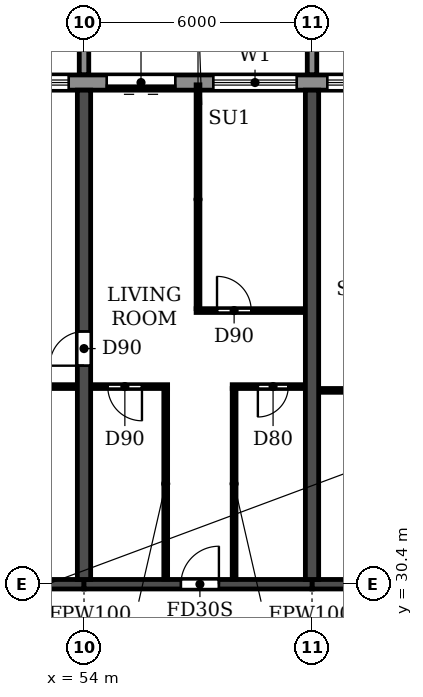
"""IFC4 building model, lengths in metres.
Left out: names, types, materials, properties, quantities, classifications, styles, units other than length and angle.
Written with IfcOpenShell. Run it as: python <this file> out.ifc"""

import sys

from ifc_helpers import new_model, si_unit, direction, frame, frame_2d, origin, place, context, subcontext, project, spatial, polyline, rectangle, outline, extrude, source, transform, mapped, element, fill, save


model = new_model("IFC4")
c1 = context("Model", 3, precision=1e-05, world=origin(), true_north=direction((0.0, 1.0)))
c2 = subcontext(c1, "Body", "Model", "MODEL_VIEW")
j1 = project(units=[si_unit("LENGTHUNIT", "METRE"), si_unit("PLANEANGLEUNIT", "RADIAN")], contexts=[c1])
p1 = place(None, origin())
s1 = spatial("IfcSite", under=j1, at=p1, CompositionType="ELEMENT")
p2 = place(p1, origin())
s2 = spatial("IfcBuilding", under=s1, at=p2, CompositionType="ELEMENT")
p3 = place(p2, frame((0.0, 0.0, 102.6)))
s3 = spatial("IfcBuildingStorey", under=s2, at=p3, CompositionType="ELEMENT", Elevation=102.6)
p4 = place(p3, frame((54.0, 30.525, 0.0), z_axis=(0.0, 0.0, 1.0), x_axis=(0.0, 1.0, 0.0)))
e1 = element("IfcWall", 1, at=p4, inside=s3, PredefinedType="SHEAR", context=c2, shape_type="SweptSolid", body=[
    extrude(rectangle(XDim=12.875, YDim=0.35, at=frame_2d((6.438, 0.0))), origin(), (0.0, 0.0, 1.0), 3.0),
])
p5 = place(p4, frame((5.625, 0.0, 0.0)))
e2 = element("IfcOpeningElement", 2, at=p5, cuts=e1, PredefinedType="OPENING", context=c2, shape_type="SweptSolid", body=[
    extrude(rectangle(XDim=0.9, YDim=2.1, at=frame_2d((0.45, 1.05))), frame((0.0, 0.185, 0.0), z_axis=(0.0, -1.0, 0.0), x_axis=(1.0, 0.0, 0.0)), (0.0, 0.0, 1.0), 0.37),
])
p6 = place(p3, frame((60.0, 30.525, 0.0), z_axis=(0.0, 0.0, 1.0), x_axis=(0.0, 1.0, 0.0)))
e3 = element("IfcWall", 3, at=p6, inside=s3, PredefinedType="SHEAR", context=c2, shape_type="SweptSolid", body=[
    extrude(rectangle(XDim=12.875, YDim=0.35, at=frame_2d((6.438, 0.0))), origin(), (0.0, 0.0, 1.0), 3.0),
])
p7 = place(p3, frame((48.0, 30.4, 0.0), z_axis=(0.0, 0.0, 1.0), x_axis=(1.0, 0.0, 0.0)))
e4 = element("IfcWall", 4, at=p7, inside=s3, PredefinedType="SHEAR", context=c2, shape_type="SweptSolid", body=[
    extrude(rectangle(XDim=6.0, YDim=0.25, at=frame_2d((3.0, 0.0))), origin(), (0.0, 0.0, 1.0), 2.4),
])
p8 = place(p3, frame((54.0, 30.4, 0.0), z_axis=(0.0, 0.0, 1.0), x_axis=(1.0, 0.0, 0.0)))
e5 = element("IfcWall", 5, at=p8, inside=s3, PredefinedType="SHEAR", context=c2, shape_type="SweptSolid", body=[
    extrude(rectangle(XDim=6.0, YDim=0.25, at=frame_2d((3.0, 0.0))), origin(), (0.0, 0.0, 1.0), 2.4),
])
p9 = place(p8, frame((2.55, 0.0, 0.0)))
e6 = element("IfcOpeningElement", 6, at=p9, cuts=e5, PredefinedType="OPENING", context=c2, shape_type="SweptSolid", body=[
    extrude(rectangle(XDim=1.0, YDim=2.1, at=frame_2d((0.5, 1.05))), frame((0.0, 0.135, 0.0), z_axis=(0.0, -1.0, 0.0), x_axis=(1.0, 0.0, 0.0)), (0.0, 0.0, 1.0), 0.27),
])
p10 = place(p3, frame((60.0, 30.4, 0.0), z_axis=(0.0, 0.0, 1.0), x_axis=(1.0, 0.0, 0.0)))
e7 = element("IfcWall", 7, at=p10, inside=s3, PredefinedType="SHEAR", context=c2, shape_type="SweptSolid", body=[
    extrude(rectangle(XDim=6.0, YDim=0.25, at=frame_2d((3.0, 0.0))), origin(), (0.0, 0.0, 1.0), 2.4),
])
p11 = place(p10, frame((2.45, 0.0, 0.0)))
e8 = element("IfcOpeningElement", 8, at=p11, cuts=e7, PredefinedType="OPENING", context=c2, shape_type="SweptSolid", body=[
    extrude(rectangle(XDim=1.0, YDim=2.1, at=frame_2d((0.5, 1.05))), frame((0.0, 0.135, 0.0), z_axis=(0.0, -1.0, 0.0), x_axis=(1.0, 0.0, 0.0)), (0.0, 0.0, 1.0), 0.27),
])
p12 = place(p3, frame((91.317, 43.6, 0.0), z_axis=(0.0, 0.0, 1.0), x_axis=(-1.0, 0.0, 0.0)))
e9 = element("IfcWall", 9, at=p12, inside=s3, PredefinedType="STANDARD", context=c2, shape_type="SweptSolid", body=[
    extrude(rectangle(XDim=80.634, YDim=0.4, at=frame_2d((40.317, 0.0))), origin(), (0.0, 0.0, 1.0), 3.0),
])
p13 = place(p12, frame((76.717, 0.0, 0.9)))
e10 = element("IfcOpeningElement", 10, at=p13, cuts=e9, PredefinedType="OPENING", context=c2, shape_type="SweptSolid", body=[
    extrude(rectangle(XDim=2.2, YDim=1.5, at=frame_2d((1.1, 0.75))), frame((0.0, 0.21, 0.0), z_axis=(0.0, -1.0, 0.0), x_axis=(1.0, 0.0, 0.0)), (0.0, 0.0, 1.0), 0.42),
])
p14 = place(p12, frame((73.917, 0.0, 0.0)))
e11 = element("IfcOpeningElement", 11, at=p14, cuts=e9, PredefinedType="OPENING", context=c2, shape_type="SweptSolid", body=[
    extrude(rectangle(XDim=1.8, YDim=2.4, at=frame_2d((0.9, 1.2))), frame((0.0, 0.21, 0.0), z_axis=(0.0, -1.0, 0.0), x_axis=(1.0, 0.0, 0.0)), (0.0, 0.0, 1.0), 0.42),
])
p15 = place(p12, frame((70.717, 0.0, 0.9)))
e12 = element("IfcOpeningElement", 12, at=p15, cuts=e9, PredefinedType="OPENING", context=c2, shape_type="SweptSolid", body=[
    extrude(rectangle(XDim=2.2, YDim=1.5, at=frame_2d((1.1, 0.75))), frame((0.0, 0.21, 0.0), z_axis=(0.0, -1.0, 0.0), x_axis=(1.0, 0.0, 0.0)), (0.0, 0.0, 1.0), 0.42),
])
p16 = place(p12, frame((67.717, 0.0, 0.9)))
e13 = element("IfcOpeningElement", 13, at=p16, cuts=e9, PredefinedType="OPENING", context=c2, shape_type="SweptSolid", body=[
    extrude(rectangle(XDim=2.2, YDim=1.5, at=frame_2d((1.1, 0.75))), frame((0.0, 0.21, 0.0), z_axis=(0.0, -1.0, 0.0), x_axis=(1.0, 0.0, 0.0)), (0.0, 0.0, 1.0), 0.42),
])
p17 = place(p12, frame((64.917, 0.0, 0.0)))
e14 = element("IfcOpeningElement", 14, at=p17, cuts=e9, PredefinedType="OPENING", context=c2, shape_type="SweptSolid", body=[
    extrude(rectangle(XDim=1.8, YDim=2.4, at=frame_2d((0.9, 1.2))), frame((0.0, 0.21, 0.0), z_axis=(0.0, -1.0, 0.0), x_axis=(1.0, 0.0, 0.0)), (0.0, 0.0, 1.0), 0.42),
])
p18 = place(p12, frame((61.717, 0.0, 0.9)))
e15 = element("IfcOpeningElement", 15, at=p18, cuts=e9, PredefinedType="OPENING", context=c2, shape_type="SweptSolid", body=[
    extrude(rectangle(XDim=2.2, YDim=1.5, at=frame_2d((1.1, 0.75))), frame((0.0, 0.21, 0.0), z_axis=(0.0, -1.0, 0.0), x_axis=(1.0, 0.0, 0.0)), (0.0, 0.0, 1.0), 0.42),
])
p19 = place(p12, frame((58.717, 0.0, 0.9)))
e16 = element("IfcOpeningElement", 16, at=p19, cuts=e9, PredefinedType="OPENING", context=c2, shape_type="SweptSolid", body=[
    extrude(rectangle(XDim=2.2, YDim=1.5, at=frame_2d((1.1, 0.75))), frame((0.0, 0.21, 0.0), z_axis=(0.0, -1.0, 0.0), x_axis=(1.0, 0.0, 0.0)), (0.0, 0.0, 1.0), 0.42),
])
p20 = place(p12, frame((55.717, 0.0, 0.9)))
e17 = element("IfcOpeningElement", 17, at=p20, cuts=e9, PredefinedType="OPENING", context=c2, shape_type="SweptSolid", body=[
    extrude(rectangle(XDim=2.2, YDim=1.5, at=frame_2d((1.1, 0.75))), frame((0.0, 0.21, 0.0), z_axis=(0.0, -1.0, 0.0), x_axis=(1.0, 0.0, 0.0)), (0.0, 0.0, 1.0), 0.42),
])
p21 = place(p12, frame((52.717, 0.0, 0.9)))
e18 = element("IfcOpeningElement", 18, at=p21, cuts=e9, PredefinedType="OPENING", context=c2, shape_type="SweptSolid", body=[
    extrude(rectangle(XDim=2.2, YDim=1.5, at=frame_2d((1.1, 0.75))), frame((0.0, 0.21, 0.0), z_axis=(0.0, -1.0, 0.0), x_axis=(1.0, 0.0, 0.0)), (0.0, 0.0, 1.0), 0.42),
])
p22 = place(p12, frame((49.917, 0.0, 0.0)))
e19 = element("IfcOpeningElement", 19, at=p22, cuts=e9, PredefinedType="OPENING", context=c2, shape_type="SweptSolid", body=[
    extrude(rectangle(XDim=1.8, YDim=2.4, at=frame_2d((0.9, 1.2))), frame((0.0, 0.21, 0.0), z_axis=(0.0, -1.0, 0.0), x_axis=(1.0, 0.0, 0.0)), (0.0, 0.0, 1.0), 0.42),
])
p23 = place(p12, frame((46.717, 0.0, 0.9)))
e20 = element("IfcOpeningElement", 20, at=p23, cuts=e9, PredefinedType="OPENING", context=c2, shape_type="SweptSolid", body=[
    extrude(rectangle(XDim=2.2, YDim=1.5, at=frame_2d((1.1, 0.75))), frame((0.0, 0.21, 0.0), z_axis=(0.0, -1.0, 0.0), x_axis=(1.0, 0.0, 0.0)), (0.0, 0.0, 1.0), 0.42),
])
p24 = place(p12, frame((43.917, 0.0, 0.0)))
e21 = element("IfcOpeningElement", 21, at=p24, cuts=e9, PredefinedType="OPENING", context=c2, shape_type="SweptSolid", body=[
    extrude(rectangle(XDim=1.8, YDim=2.4, at=frame_2d((0.9, 1.2))), frame((0.0, 0.21, 0.0), z_axis=(0.0, -1.0, 0.0), x_axis=(1.0, 0.0, 0.0)), (0.0, 0.0, 1.0), 0.42),
])
p25 = place(p12, frame((40.717, 0.0, 0.9)))
e22 = element("IfcOpeningElement", 22, at=p25, cuts=e9, PredefinedType="OPENING", context=c2, shape_type="SweptSolid", body=[
    extrude(rectangle(XDim=2.2, YDim=1.5, at=frame_2d((1.1, 0.75))), frame((0.0, 0.21, 0.0), z_axis=(0.0, -1.0, 0.0), x_axis=(1.0, 0.0, 0.0)), (0.0, 0.0, 1.0), 0.42),
])
p26 = place(p12, frame((37.717, 0.0, 0.9)))
e23 = element("IfcOpeningElement", 23, at=p26, cuts=e9, PredefinedType="OPENING", context=c2, shape_type="SweptSolid", body=[
    extrude(rectangle(XDim=2.2, YDim=1.5, at=frame_2d((1.1, 0.75))), frame((0.0, 0.21, 0.0), z_axis=(0.0, -1.0, 0.0), x_axis=(1.0, 0.0, 0.0)), (0.0, 0.0, 1.0), 0.42),
])
p27 = place(p12, frame((34.917, 0.0, 0.0)))
e24 = element("IfcOpeningElement", 24, at=p27, cuts=e9, PredefinedType="OPENING", context=c2, shape_type="SweptSolid", body=[
    extrude(rectangle(XDim=1.8, YDim=2.4, at=frame_2d((0.9, 1.2))), frame((0.0, 0.21, 0.0), z_axis=(0.0, -1.0, 0.0), x_axis=(1.0, 0.0, 0.0)), (0.0, 0.0, 1.0), 0.42),
])
p28 = place(p12, frame((31.717, 0.0, 0.9)))
e25 = element("IfcOpeningElement", 25, at=p28, cuts=e9, PredefinedType="OPENING", context=c2, shape_type="SweptSolid", body=[
    extrude(rectangle(XDim=2.2, YDim=1.5, at=frame_2d((1.1, 0.75))), frame((0.0, 0.21, 0.0), z_axis=(0.0, -1.0, 0.0), x_axis=(1.0, 0.0, 0.0)), (0.0, 0.0, 1.0), 0.42),
])
p29 = place(p12, frame((28.717, 0.0, 0.9)))
e26 = element("IfcOpeningElement", 26, at=p29, cuts=e9, PredefinedType="OPENING", context=c2, shape_type="SweptSolid", body=[
    extrude(rectangle(XDim=2.2, YDim=1.5, at=frame_2d((1.1, 0.75))), frame((0.0, 0.21, 0.0), z_axis=(0.0, -1.0, 0.0), x_axis=(1.0, 0.0, 0.0)), (0.0, 0.0, 1.0), 0.42),
])
p30 = place(p12, frame((25.917, 0.0, 0.0)))
e27 = element("IfcOpeningElement", 27, at=p30, cuts=e9, PredefinedType="OPENING", context=c2, shape_type="SweptSolid", body=[
    extrude(rectangle(XDim=1.8, YDim=2.4, at=frame_2d((0.9, 1.2))), frame((0.0, 0.21, 0.0), z_axis=(0.0, -1.0, 0.0), x_axis=(1.0, 0.0, 0.0)), (0.0, 0.0, 1.0), 0.42),
])
p31 = place(p12, frame((22.717, 0.0, 0.9)))
e28 = element("IfcOpeningElement", 28, at=p31, cuts=e9, PredefinedType="OPENING", context=c2, shape_type="SweptSolid", body=[
    extrude(rectangle(XDim=2.2, YDim=1.5, at=frame_2d((1.1, 0.75))), frame((0.0, 0.21, 0.0), z_axis=(0.0, -1.0, 0.0), x_axis=(1.0, 0.0, 0.0)), (0.0, 0.0, 1.0), 0.42),
])
p32 = place(p12, frame((19.717, 0.0, 0.9)))
e29 = element("IfcOpeningElement", 29, at=p32, cuts=e9, PredefinedType="OPENING", context=c2, shape_type="SweptSolid", body=[
    extrude(rectangle(XDim=2.2, YDim=1.5, at=frame_2d((1.1, 0.75))), frame((0.0, 0.21, 0.0), z_axis=(0.0, -1.0, 0.0), x_axis=(1.0, 0.0, 0.0)), (0.0, 0.0, 1.0), 0.42),
])
p33 = place(p12, frame((16.917, 0.0, 0.0)))
e30 = element("IfcOpeningElement", 30, at=p33, cuts=e9, PredefinedType="OPENING", context=c2, shape_type="SweptSolid", body=[
    extrude(rectangle(XDim=1.8, YDim=2.4, at=frame_2d((0.9, 1.2))), frame((0.0, 0.21, 0.0), z_axis=(0.0, -1.0, 0.0), x_axis=(1.0, 0.0, 0.0)), (0.0, 0.0, 1.0), 0.42),
])
p34 = place(p12, frame((13.717, 0.0, 0.9)))
e31 = element("IfcOpeningElement", 31, at=p34, cuts=e9, PredefinedType="OPENING", context=c2, shape_type="SweptSolid", body=[
    extrude(rectangle(XDim=2.2, YDim=1.5, at=frame_2d((1.1, 0.75))), frame((0.0, 0.21, 0.0), z_axis=(0.0, -1.0, 0.0), x_axis=(1.0, 0.0, 0.0)), (0.0, 0.0, 1.0), 0.42),
])
p35 = place(p12, frame((10.917, 0.0, 0.0)))
e32 = element("IfcOpeningElement", 32, at=p35, cuts=e9, PredefinedType="OPENING", context=c2, shape_type="SweptSolid", body=[
    extrude(rectangle(XDim=1.8, YDim=2.4, at=frame_2d((0.9, 1.2))), frame((0.0, 0.21, 0.0), z_axis=(0.0, -1.0, 0.0), x_axis=(1.0, 0.0, 0.0)), (0.0, 0.0, 1.0), 0.42),
])
p36 = place(p12, frame((7.717, 0.0, 0.9)))
e33 = element("IfcOpeningElement", 33, at=p36, cuts=e9, PredefinedType="OPENING", context=c2, shape_type="SweptSolid", body=[
    extrude(rectangle(XDim=2.2, YDim=1.5, at=frame_2d((1.1, 0.75))), frame((0.0, 0.21, 0.0), z_axis=(0.0, -1.0, 0.0), x_axis=(1.0, 0.0, 0.0)), (0.0, 0.0, 1.0), 0.42),
])
p37 = place(p12, frame((4.717, 0.0, 0.9)))
e34 = element("IfcOpeningElement", 34, at=p37, cuts=e9, PredefinedType="OPENING", context=c2, shape_type="SweptSolid", body=[
    extrude(rectangle(XDim=2.2, YDim=1.5, at=frame_2d((1.1, 0.75))), frame((0.0, 0.21, 0.0), z_axis=(0.0, -1.0, 0.0), x_axis=(1.0, 0.0, 0.0)), (0.0, 0.0, 1.0), 0.42),
])
p38 = place(p12, frame((1.917, 0.0, 0.0)))
e35 = element("IfcOpeningElement", 35, at=p38, cuts=e9, PredefinedType="OPENING", context=c2, shape_type="SweptSolid", body=[
    extrude(rectangle(XDim=1.8, YDim=2.4, at=frame_2d((0.9, 1.2))), frame((0.0, 0.21, 0.0), z_axis=(0.0, -1.0, 0.0), x_axis=(1.0, 0.0, 0.0)), (0.0, 0.0, 1.0), 0.42),
])
m1 = source(origin(), c2, "Body", "SweptSolid", [
    extrude(outline(polyline([(0.0, 0.0), (0.25, 0.0), (0.25, 3.1), (0.0, 3.1), (0.0, 0.0)])), origin(), (0.0, 0.0, 1.0), 3.1),
])
for number, where in (
    (36, (53.875, 43.8, 0.0)),
    (37, (59.875, 43.8, 0.0)),
):
    element("IfcWall", number, at=place(p3, frame(where)), inside=s3, PredefinedType="STANDARD", context=c2, shape_type="MappedRepresentation", body=[
        mapped(m1, transform((0.0, 0.0, 0.0))),
    ])
p39 = place(p3, frame((60.185, 35.5, 0.0), z_axis=(0.0, 0.0, 1.0), x_axis=(1.0, 0.0, 0.0)))
e38 = element("IfcWall", 38, at=p39, inside=s3, PredefinedType="PARTITIONING", context=c2, shape_type="SweptSolid", body=[
    extrude(rectangle(XDim=1.915, YDim=0.1, at=frame_2d((0.958, 0.0))), origin(), (0.0, 0.0, 1.0), 3.0),
])
p40 = place(p3, frame((51.1, 35.6, 0.0), z_axis=(0.0, 0.0, 1.0), x_axis=(1.0, 0.0, 0.0)))
e39 = element("IfcWall", 39, at=p40, inside=s3, PredefinedType="PARTITIONING", context=c2, shape_type="SweptSolid", body=[
    extrude(rectangle(XDim=2.715, YDim=0.1, at=frame_2d((1.357, 0.0))), origin(), (0.0, 0.0, 1.0), 3.0),
])
p41 = place(p40, frame((1.0, 0.0, 0.0)))
e40 = element("IfcOpeningElement", 40, at=p41, cuts=e39, PredefinedType="OPENING", context=c2, shape_type="SweptSolid", body=[
    extrude(rectangle(XDim=0.8, YDim=2.1, at=frame_2d((0.4, 1.05))), frame((0.0, 0.06, 0.0), z_axis=(0.0, -1.0, 0.0), x_axis=(1.0, 0.0, 0.0)), (0.0, 0.0, 1.0), 0.12),
])
p42 = place(p3, frame((54.185, 35.6, 0.0), z_axis=(0.0, 0.0, 1.0), x_axis=(1.0, 0.0, 0.0)))
e41 = element("IfcWall", 41, at=p42, inside=s3, PredefinedType="PARTITIONING", context=c2, shape_type="SweptSolid", body=[
    extrude(rectangle(XDim=2.015, YDim=0.1, at=frame_2d((1.007, 0.0))), origin(), (0.0, 0.0, 1.0), 3.0),
])
p43 = place(p42, frame((0.44, 0.0, 0.0)))
e42 = element("IfcOpeningElement", 42, at=p43, cuts=e41, PredefinedType="OPENING", context=c2, shape_type="SweptSolid", body=[
    extrude(rectangle(XDim=0.9, YDim=2.1, at=frame_2d((0.45, 1.05))), frame((0.0, 0.06, 0.0), z_axis=(0.0, -1.0, 0.0), x_axis=(1.0, 0.0, 0.0)), (0.0, 0.0, 1.0), 0.12),
])
p44 = place(p3, frame((57.9, 35.6, 0.0), z_axis=(0.0, 0.0, 1.0), x_axis=(1.0, 0.0, 0.0)))
e43 = element("IfcWall", 43, at=p44, inside=s3, PredefinedType="PARTITIONING", context=c2, shape_type="SweptSolid", body=[
    extrude(rectangle(XDim=1.915, YDim=0.1, at=frame_2d((0.958, 0.0))), origin(), (0.0, 0.0, 1.0), 3.0),
])
p45 = place(p44, frame((0.675, 0.0, 0.0)))
e44 = element("IfcOpeningElement", 44, at=p45, cuts=e43, PredefinedType="OPENING", context=c2, shape_type="SweptSolid", body=[
    extrude(rectangle(XDim=0.8, YDim=2.1, at=frame_2d((0.4, 1.05))), frame((0.0, 0.06, 0.0), z_axis=(0.0, -1.0, 0.0), x_axis=(1.0, 0.0, 0.0)), (0.0, 0.0, 1.0), 0.12),
])
p46 = place(p3, frame((56.95, 37.6, 0.0), z_axis=(0.0, 0.0, 1.0), x_axis=(1.0, 0.0, 0.0)))
e45 = element("IfcWall", 45, at=p46, inside=s3, PredefinedType="PARTITIONING", context=c2, shape_type="SweptSolid", body=[
    extrude(rectangle(XDim=2.865, YDim=0.1, at=frame_2d((1.433, 0.0))), origin(), (0.0, 0.0, 1.0), 3.0),
])
p47 = place(p46, frame((0.55, 0.0, 0.0)))
e46 = element("IfcOpeningElement", 46, at=p47, cuts=e45, PredefinedType="OPENING", context=c2, shape_type="SweptSolid", body=[
    extrude(rectangle(XDim=0.9, YDim=2.1, at=frame_2d((0.45, 1.05))), frame((0.0, 0.06, 0.0), z_axis=(0.0, -1.0, 0.0), x_axis=(1.0, 0.0, 0.0)), (0.0, 0.0, 1.0), 0.12),
])
p48 = place(p3, frame((56.15, 30.535, 0.0), z_axis=(0.0, 0.0, 1.0), x_axis=(0.0, 1.0, 0.0)))
e47 = element("IfcWall", 47, at=p48, inside=s3, PredefinedType="PARTITIONING", context=c2, shape_type="SweptSolid", body=[
    extrude(rectangle(XDim=5.015, YDim=0.1, at=frame_2d((2.508, 0.0))), origin(), (0.0, 0.0, 1.0), 3.0),
])
p49 = place(p3, frame((57.0, 37.65, 0.0), z_axis=(0.0, 0.0, 1.0), x_axis=(0.0, 1.0, 0.0)))
e48 = element("IfcWall", 48, at=p49, inside=s3, PredefinedType="PARTITIONING", context=c2, shape_type="SweptSolid", body=[
    extrude(rectangle(XDim=5.89, YDim=0.1, at=frame_2d((2.945, 0.0))), origin(), (0.0, 0.0, 1.0), 3.0),
])
p50 = place(p3, frame((57.95, 30.535, 0.0), z_axis=(0.0, 0.0, 1.0), x_axis=(0.0, 1.0, 0.0)))
e49 = element("IfcWall", 49, at=p50, inside=s3, PredefinedType="PARTITIONING", context=c2, shape_type="SweptSolid", body=[
    extrude(rectangle(XDim=5.015, YDim=0.1, at=frame_2d((2.508, 0.0))), origin(), (0.0, 0.0, 1.0), 3.0),
])
p51 = place(p26, origin())
e50 = element("IfcWindow", 50, at=p51, inside=s3, PartitioningType="DOUBLE_PANEL_HORIZONTAL", PredefinedType="WINDOW", context=c2, shape_type="SweptSolid", body=[
    extrude(rectangle(XDim=2.2, YDim=1.5, at=frame_2d((1.1, 0.75))), frame((0.0, 0.03, 0.0), z_axis=(0.0, -1.0, 0.0), x_axis=(1.0, 0.0, 0.0)), (0.0, 0.0, 1.0), 0.06),
])
fill(e23, e50)
p52 = place(p27, origin())
e51 = element("IfcDoor", 51, at=p52, inside=s3, OperationType="DOUBLE_DOOR_SLIDING", PredefinedType="DOOR", context=c2, shape_type="SweptSolid", body=[
    extrude(rectangle(XDim=1.8, YDim=2.4, at=frame_2d((0.9, 1.2))), frame((0.0, 0.025, 0.0), z_axis=(0.0, -1.0, 0.0), x_axis=(1.0, 0.0, 0.0)), (0.0, 0.0, 1.0), 0.05),
])
fill(e24, e51)
p53 = place(p28, origin())
e52 = element("IfcWindow", 52, at=p53, inside=s3, PartitioningType="DOUBLE_PANEL_HORIZONTAL", PredefinedType="WINDOW", context=c2, shape_type="SweptSolid", body=[
    extrude(rectangle(XDim=2.2, YDim=1.5, at=frame_2d((1.1, 0.75))), frame((0.0, 0.03, 0.0), z_axis=(0.0, -1.0, 0.0), x_axis=(1.0, 0.0, 0.0)), (0.0, 0.0, 1.0), 0.06),
])
fill(e25, e52)
p54 = place(p29, origin())
e53 = element("IfcWindow", 53, at=p54, inside=s3, PartitioningType="DOUBLE_PANEL_HORIZONTAL", PredefinedType="WINDOW", context=c2, shape_type="SweptSolid", body=[
    extrude(rectangle(XDim=2.2, YDim=1.5, at=frame_2d((1.1, 0.75))), frame((0.0, 0.03, 0.0), z_axis=(0.0, -1.0, 0.0), x_axis=(1.0, 0.0, 0.0)), (0.0, 0.0, 1.0), 0.06),
])
fill(e26, e53)
p55 = place(p5, origin())
e54 = element("IfcDoor", 54, at=p55, inside=s3, OperationType="SINGLE_SWING_LEFT", PredefinedType="DOOR", context=c2, shape_type="SweptSolid", body=[
    extrude(rectangle(XDim=0.9, YDim=2.1, at=frame_2d((0.45, 1.05))), frame((0.0, 0.025, 0.0), z_axis=(0.0, -1.0, 0.0), x_axis=(1.0, 0.0, 0.0)), (0.0, 0.0, 1.0), 0.05),
])
fill(e2, e54)
p56 = place(p43, frame((0.9, 0.0, 0.0), z_axis=(0.0, 0.0, 1.0), x_axis=(-1.0, 0.0, 0.0)))
e55 = element("IfcDoor", 55, at=p56, inside=s3, OperationType="SINGLE_SWING_LEFT", PredefinedType="DOOR", context=c2, shape_type="SweptSolid", body=[
    extrude(rectangle(XDim=0.9, YDim=2.1, at=frame_2d((0.45, 1.05))), frame((0.0, 0.025, 0.0), z_axis=(0.0, -1.0, 0.0), x_axis=(1.0, 0.0, 0.0)), (0.0, 0.0, 1.0), 0.05),
])
fill(e42, e55)
p57 = place(p9, origin())
e56 = element("IfcDoor", 56, at=p57, inside=s3, OperationType="SINGLE_SWING_RIGHT", PredefinedType="DOOR", context=c2, shape_type="SweptSolid", body=[
    extrude(rectangle(XDim=1.0, YDim=2.1, at=frame_2d((0.5, 1.05))), frame((0.0, 0.025, 0.0), z_axis=(0.0, -1.0, 0.0), x_axis=(1.0, 0.0, 0.0)), (0.0, 0.0, 1.0), 0.05),
])
fill(e6, e56)
p58 = place(p47, origin())
e57 = element("IfcDoor", 57, at=p58, inside=s3, OperationType="SINGLE_SWING_LEFT", PredefinedType="DOOR", context=c2, shape_type="SweptSolid", body=[
    extrude(rectangle(XDim=0.9, YDim=2.1, at=frame_2d((0.45, 1.05))), frame((0.0, 0.025, 0.0), z_axis=(0.0, -1.0, 0.0), x_axis=(1.0, 0.0, 0.0)), (0.0, 0.0, 1.0), 0.05),
])
fill(e46, e57)
p59 = place(p45, frame((0.8, 0.0, 0.0), z_axis=(0.0, 0.0, 1.0), x_axis=(-1.0, 0.0, 0.0)))
e58 = element("IfcDoor", 58, at=p59, inside=s3, OperationType="SINGLE_SWING_RIGHT", PredefinedType="DOOR", context=c2, shape_type="SweptSolid", body=[
    extrude(rectangle(XDim=0.8, YDim=2.1, at=frame_2d((0.4, 1.05))), frame((0.0, 0.025, 0.0), z_axis=(0.0, -1.0, 0.0), x_axis=(1.0, 0.0, 0.0)), (0.0, 0.0, 1.0), 0.05),
])
fill(e44, e58)
save(model, sys.argv[1])
